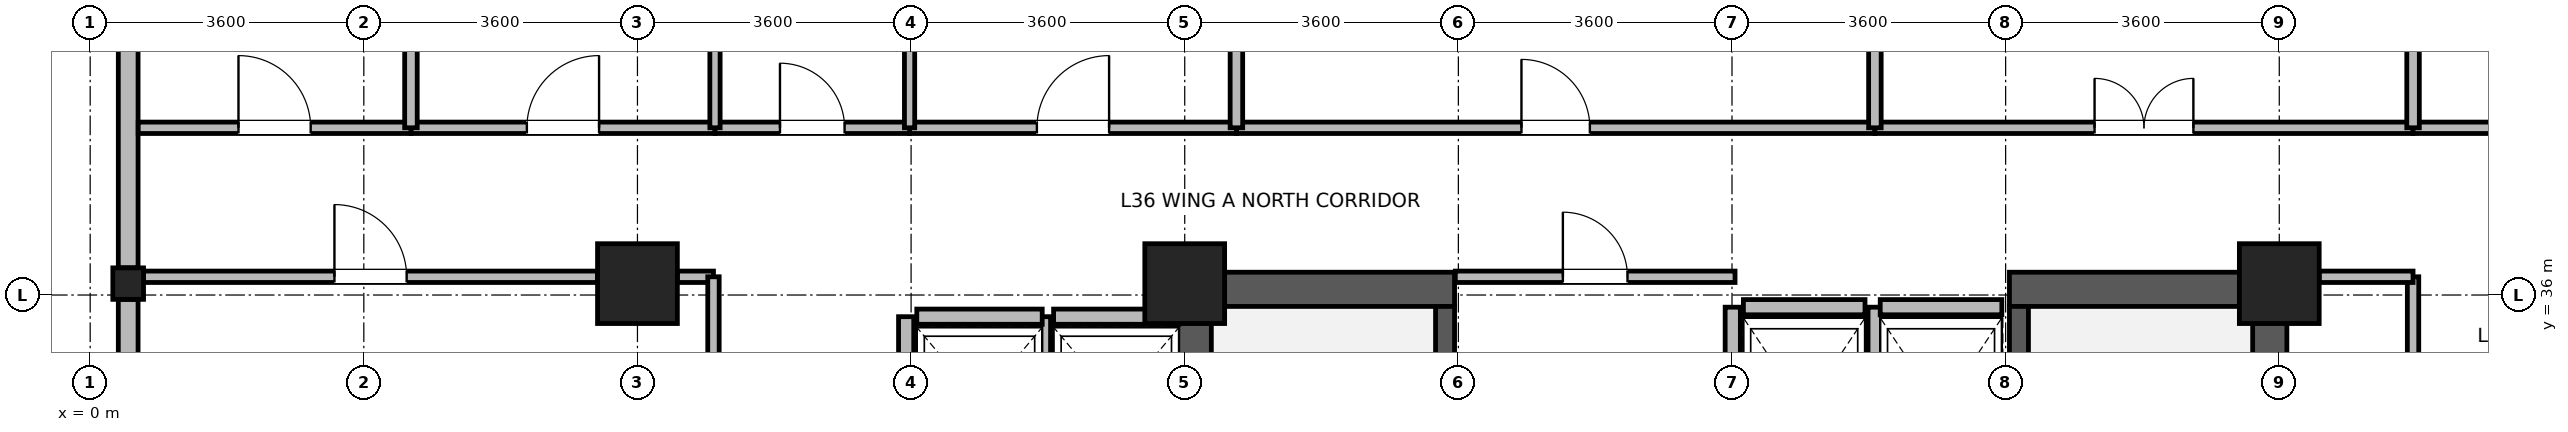
"""IFC4 building model, lengths in metres.
Left out: names, types, materials, properties, quantities, classifications, styles, units other than length and angle.
Written with IfcOpenShell. Run it as: python <this file> out.ifc"""

import sys

from ifc_helpers import new_model, si_unit, direction, frame, frame_2d, origin, origin_2d, place, context, subcontext, project, spatial, rectangle, i_section, extrude, source, transform, mapped, element, fill, save


model = new_model("IFC4")
c1 = context("Model", 3, precision=1e-05, world=origin(), true_north=direction((0.0, 1.0)))
c2 = subcontext(c1, "Body", "Model", "MODEL_VIEW")
j1 = project(units=[si_unit("LENGTHUNIT", "METRE"), si_unit("PLANEANGLEUNIT", "RADIAN")], contexts=[c1])
p1 = place(None, origin())
s1 = spatial("IfcSite", under=j1, at=p1, CompositionType="ELEMENT")
p2 = place(p1, origin())
s2 = spatial("IfcBuilding", under=s1, at=p2, CompositionType="ELEMENT")
p3 = place(p2, frame((0.0, 0.0, 143.9)))
s3 = spatial("IfcBuildingStorey", under=s2, at=p3, CompositionType="ELEMENT", Elevation=143.9)
for number, where, z_axis, x_axis in (
    (1, (14.525, 28.4, 0.0), (0.0, 0.0, 1.0), (0.0, 1.0, 0.0)),
    (2, (28.675, 28.4, 0.0), (0.0, 0.0, 1.0), (0.0, 1.0, 0.0)),
):
    element("IfcWall", number, at=place(p3, frame(where, z_axis=z_axis, x_axis=x_axis)), inside=s3, PredefinedType="SHEAR", context=c2, shape_type="SweptSolid", body=[
        extrude(rectangle(XDim=7.9, YDim=0.45, at=frame_2d((3.95, 0.0))), origin(), (0.0, 0.0, 1.0), 3.46),
    ])
for number, where, z_axis, x_axis in (
    (3, (14.75, 36.075, 0.0), (0.0, 0.0, 1.0), (1.0, 0.0, 0.0)),
    (4, (25.25, 36.075, 0.0), (0.0, 0.0, 1.0), (1.0, 0.0, 0.0)),
):
    element("IfcWall", number, at=place(p3, frame(where, z_axis=z_axis, x_axis=x_axis)), inside=s3, PredefinedType="SHEAR", context=c2, shape_type="SweptSolid", body=[
        extrude(rectangle(XDim=3.2, YDim=0.45, at=frame_2d((1.6, 0.0))), origin(), (0.0, 0.0, 1.0), 3.46),
    ])
p4 = place(p3, frame((17.825, 28.85, 0.0), z_axis=(0.0, 0.0, 1.0), x_axis=(0.0, 1.0, 0.0)))
e5 = element("IfcWall", 5, at=p4, inside=s3, PredefinedType="SHEAR", context=c2, shape_type="SweptSolid", body=[
    extrude(rectangle(XDim=7.0, YDim=0.25, at=frame_2d((3.5, 0.0))), origin(), (0.0, 0.0, 1.0), 3.46),
])
p5 = place(p4, frame((0.15, 0.0, 0.0)))
e6 = element("IfcOpeningElement", 6, at=p5, cuts=e5, PredefinedType="OPENING", context=c2, shape_type="SweptSolid", body=[
    extrude(rectangle(XDim=1.1, YDim=2.08, at=frame_2d((0.55, 1.04))), frame((0.0, 0.135, 0.0), z_axis=(0.0, -1.0, 0.0), x_axis=(1.0, 0.0, 0.0)), (0.0, 0.0, 1.0), 0.27),
])
p6 = place(p3, frame((25.375, 28.85, 0.0), z_axis=(0.0, 0.0, 1.0), x_axis=(0.0, 1.0, 0.0)))
e7 = element("IfcWall", 7, at=p6, inside=s3, PredefinedType="SHEAR", context=c2, shape_type="SweptSolid", body=[
    extrude(rectangle(XDim=7.0, YDim=0.25, at=frame_2d((3.5, 0.0))), origin(), (0.0, 0.0, 1.0), 3.46),
])
p7 = place(p6, frame((0.15, 0.0, 0.0)))
e8 = element("IfcOpeningElement", 8, at=p7, cuts=e7, PredefinedType="OPENING", context=c2, shape_type="SweptSolid", body=[
    extrude(rectangle(XDim=1.1, YDim=2.08, at=frame_2d((0.55, 1.04))), frame((0.0, 0.135, 0.0), z_axis=(0.0, -1.0, 0.0), x_axis=(1.0, 0.0, 0.0)), (0.0, 0.0, 1.0), 0.27),
])
m1 = source(origin(), c2, "Body", "SweptSolid", [
    extrude(rectangle(XDim=1.05, YDim=1.05, at=origin_2d()), origin(), (0.0, 0.0, 1.0), 3.7),
])
for number, where, z_axis, x_axis in (
    (9, (7.2, 36.15, 0.0), (0.0, 0.0, 1.0), (1.0, 0.0, 0.0)),
    (10, (14.4, 36.15, 0.0), (0.0, 0.0, 1.0), (1.0, 0.0, 0.0)),
    (11, (28.8, 36.15, 0.0), (0.0, 0.0, 1.0), (1.0, 0.0, 0.0)),
):
    element("IfcColumn", number, at=place(p3, frame(where, z_axis=z_axis, x_axis=x_axis)), inside=s3, PredefinedType="COLUMN", context=c2, shape_type="MappedRepresentation", body=[
        mapped(m1, transform((0.0, 0.0, 0.0), x_axis=(1.0, 0.0, 0.0), y_axis=(0.0, 1.0, 0.0), z_axis=(0.0, 0.0, 1.0), scale=1.0)),
    ])
m2 = source(origin(), c2, "Body", "SweptSolid", [
    extrude(i_section(OverallWidth=0.404, OverallDepth=0.414, WebThickness=0.021, FlangeThickness=0.028, FilletRadius=0.015, at=origin_2d()), origin(), (0.0, 0.0, 1.0), 3.7),
])
p8 = place(p3, frame((0.5, 36.15, 0.0), z_axis=(0.0, 0.0, 1.0), x_axis=(1.0, 0.0, 0.0)))
e12 = element("IfcColumn", 12, at=p8, inside=s3, PredefinedType="COLUMN", context=c2, shape_type="MappedRepresentation", body=[
    mapped(m2, transform((0.0, 0.0, 0.0), x_axis=(1.0, 0.0, 0.0), y_axis=(0.0, 1.0, 0.0), z_axis=(0.0, 0.0, 1.0), scale=1.0)),
])
p9 = place(p3, frame((0.5, 36.358, 0.0), z_axis=(0.0, 0.0, 1.0), x_axis=(0.0, 1.0, 0.0)))
e13 = element("IfcWall", 13, at=p9, inside=s3, PredefinedType="STANDARD", context=c2, shape_type="SweptSolid", body=[
    extrude(rectangle(XDim=6.972, YDim=0.26, at=frame_2d((3.486, 0.0))), origin(), (0.0, 0.0, 1.0), 3.44),
])
p10 = place(p9, frame((4.329, 0.0, 0.85)))
e14 = element("IfcOpeningElement", 14, at=p10, cuts=e13, PredefinedType="OPENING", context=c2, shape_type="SweptSolid", body=[
    extrude(rectangle(XDim=1.8, YDim=1.85, at=frame_2d((0.9, 0.925))), frame((0.0, 0.14, 0.0), z_axis=(0.0, -1.0, 0.0), x_axis=(1.0, 0.0, 0.0)), (0.0, 0.0, 1.0), 0.28),
])
p11 = place(p9, frame((3.011, 0.0, 0.85)))
e15 = element("IfcOpeningElement", 15, at=p11, cuts=e13, PredefinedType="OPENING", context=c2, shape_type="SweptSolid", body=[
    extrude(rectangle(XDim=0.95, YDim=1.75, at=frame_2d((0.475, 0.875))), frame((0.0, 0.14, 0.0), z_axis=(0.0, -1.0, 0.0), x_axis=(1.0, 0.0, 0.0)), (0.0, 0.0, 1.0), 0.28),
])
p12 = place(p3, frame((0.5, 28.858, 0.0), z_axis=(0.0, 0.0, 1.0), x_axis=(0.0, 1.0, 0.0)))
e16 = element("IfcWall", 16, at=p12, inside=s3, PredefinedType="STANDARD", context=c2, shape_type="SweptSolid", body=[
    extrude(rectangle(XDim=7.084, YDim=0.26, at=frame_2d((3.542, 0.0))), origin(), (0.0, 0.0, 1.0), 2.99),
])
p13 = place(p12, frame((0.871, 0.0, 0.85)))
e17 = element("IfcOpeningElement", 17, at=p13, cuts=e16, PredefinedType="OPENING", context=c2, shape_type="SweptSolid", body=[
    extrude(rectangle(XDim=1.8, YDim=1.85, at=frame_2d((0.9, 0.925))), frame((0.0, 0.14, 0.0), z_axis=(0.0, -1.0, 0.0), x_axis=(1.0, 0.0, 0.0)), (0.0, 0.0, 1.0), 0.28),
])
p14 = place(p12, frame((4.413, 0.0, 0.85)))
e18 = element("IfcOpeningElement", 18, at=p14, cuts=e16, PredefinedType="OPENING", context=c2, shape_type="SweptSolid", body=[
    extrude(rectangle(XDim=1.8, YDim=1.85, at=frame_2d((0.9, 0.925))), frame((0.0, 0.14, 0.0), z_axis=(0.0, -1.0, 0.0), x_axis=(1.0, 0.0, 0.0)), (0.0, 0.0, 1.0), 0.28),
])
p15 = place(p3, frame((12.675, 35.715, 0.0), z_axis=(0.0, 0.0, 1.0), x_axis=(1.0, 0.0, 0.0)))
e19 = element("IfcWall", 19, at=p15, inside=s3, PredefinedType="PARTITIONING", context=c2, shape_type="SweptSolid", body=[
    extrude(rectangle(XDim=1.65, YDim=0.2, at=frame_2d((0.825, 0.0))), origin(), (0.0, 0.0, 1.0), 3.44),
])
p16 = place(p3, frame((12.535, 33.485, 0.0), z_axis=(0.0, 0.0, 1.0), x_axis=(0.0, 1.0, 0.0)))
e20 = element("IfcWall", 20, at=p16, inside=s3, PredefinedType="PARTITIONING", context=c2, shape_type="SweptSolid", body=[
    extrude(rectangle(XDim=2.23, YDim=0.2, at=frame_2d((1.115, 0.0))), origin(), (0.0, 0.0, 1.0), 3.44),
])
p17 = place(p3, frame((10.875, 35.715, 0.0), z_axis=(0.0, 0.0, 1.0), x_axis=(1.0, 0.0, 0.0)))
e21 = element("IfcWall", 21, at=p17, inside=s3, PredefinedType="PARTITIONING", context=c2, shape_type="SweptSolid", body=[
    extrude(rectangle(XDim=1.65, YDim=0.2, at=frame_2d((0.825, 0.0))), origin(), (0.0, 0.0, 1.0), 3.44),
])
p18 = place(p3, frame((10.735, 33.485, 0.0), z_axis=(0.0, 0.0, 1.0), x_axis=(0.0, 1.0, 0.0)))
e22 = element("IfcWall", 22, at=p18, inside=s3, PredefinedType="PARTITIONING", context=c2, shape_type="SweptSolid", body=[
    extrude(rectangle(XDim=2.23, YDim=0.2, at=frame_2d((1.115, 0.0))), origin(), (0.0, 0.0, 1.0), 3.44),
])
p19 = place(p3, frame((21.75, 35.84, 0.0), z_axis=(0.0, 0.0, 1.0), x_axis=(1.0, 0.0, 0.0)))
e23 = element("IfcWall", 23, at=p19, inside=s3, PredefinedType="PARTITIONING", context=c2, shape_type="SweptSolid", body=[
    extrude(rectangle(XDim=1.6, YDim=0.2, at=frame_2d((0.8, 0.0))), origin(), (0.0, 0.0, 1.0), 2.44),
])
for number, where, z_axis, x_axis in (
    (24, (21.61, 33.16, 0.0), (0.0, 0.0, 1.0), (0.0, 1.0, 0.0)),
    (25, (23.49, 33.16, 0.0), (0.0, 0.0, 1.0), (0.0, 1.0, 0.0)),
):
    element("IfcWall", number, at=place(p3, frame(where, z_axis=z_axis, x_axis=x_axis)), inside=s3, PredefinedType="PARTITIONING", context=c2, shape_type="SweptSolid", body=[
        extrude(rectangle(XDim=2.68, YDim=0.2, at=frame_2d((1.34, 0.0))), origin(), (0.0, 0.0, 1.0), 3.44),
    ])
p20 = place(p3, frame((23.55, 35.84, 0.0), z_axis=(0.0, 0.0, 1.0), x_axis=(1.0, 0.0, 0.0)))
e26 = element("IfcWall", 26, at=p20, inside=s3, PredefinedType="PARTITIONING", context=c2, shape_type="SweptSolid", body=[
    extrude(rectangle(XDim=1.6, YDim=0.2, at=frame_2d((0.8, 0.0))), origin(), (0.0, 0.0, 1.0), 2.44),
])
p21 = place(p3, frame((15.08, 38.2, 0.0), z_axis=(0.0, 0.0, 1.0), x_axis=(1.0, 0.0, 0.0)))
e27 = element("IfcWall", 27, at=p21, inside=s3, PredefinedType="PARTITIONING", context=c2, shape_type="SweptSolid", body=[
    extrude(rectangle(XDim=8.4, YDim=0.15, at=frame_2d((4.2, 0.0))), origin(), (0.0, 0.0, 1.0), 3.44),
])
p22 = place(p21, frame((3.75, 0.0, 0.0)))
e28 = element("IfcOpeningElement", 28, at=p22, cuts=e27, PredefinedType="OPENING", context=c2, shape_type="SweptSolid", body=[
    extrude(rectangle(XDim=0.9, YDim=2.08, at=frame_2d((0.45, 1.04))), frame((0.0, 0.085, 0.0), z_axis=(0.0, -1.0, 0.0), x_axis=(1.0, 0.0, 0.0)), (0.0, 0.0, 1.0), 0.17),
])
p23 = place(p3, frame((0.702, 36.24, 0.0), z_axis=(0.0, 0.0, 1.0), x_axis=(1.0, 0.0, 0.0)))
e29 = element("IfcWall", 29, at=p23, inside=s3, PredefinedType="PARTITIONING", context=c2, shape_type="SweptSolid", body=[
    extrude(rectangle(XDim=5.973, YDim=0.15, at=frame_2d((2.987, 0.0))), origin(), (0.0, 0.0, 1.0), 2.84),
])
p24 = place(p23, frame((2.511, 0.0, 0.0)))
e30 = element("IfcOpeningElement", 30, at=p24, cuts=e29, PredefinedType="OPENING", context=c2, shape_type="SweptSolid", body=[
    extrude(rectangle(XDim=0.95, YDim=2.1, at=frame_2d((0.475, 1.05))), frame((0.0, 0.085, 0.0), z_axis=(0.0, -1.0, 0.0), x_axis=(1.0, 0.0, 0.0)), (0.0, 0.0, 1.0), 0.17),
])
p25 = place(p3, frame((7.725, 36.24, 0.0), z_axis=(0.0, 0.0, 1.0), x_axis=(1.0, 0.0, 0.0)))
e31 = element("IfcWall", 31, at=p25, inside=s3, PredefinedType="PARTITIONING", context=c2, shape_type="SweptSolid", body=[
    extrude(rectangle(XDim=0.475, YDim=0.15, at=frame_2d((0.237, 0.0))), origin(), (0.0, 0.0, 1.0), 2.84),
])
p26 = place(p3, frame((23.48, 38.2, 0.0), z_axis=(0.0, 0.0, 1.0), x_axis=(1.0, 0.0, 0.0)))
e32 = element("IfcWall", 32, at=p26, inside=s3, PredefinedType="PARTITIONING", context=c2, shape_type="SweptSolid", body=[
    extrude(rectangle(XDim=7.08, YDim=0.15, at=frame_2d((3.54, 0.0))), origin(), (0.0, 0.0, 1.0), 3.44),
])
p27 = place(p26, frame((2.89, 0.0, 0.0)))
e33 = element("IfcOpeningElement", 33, at=p27, cuts=e32, PredefinedType="OPENING", context=c2, shape_type="SweptSolid", body=[
    extrude(rectangle(XDim=1.3, YDim=2.12, at=frame_2d((0.65, 1.06))), frame((0.0, 0.085, 0.0), z_axis=(0.0, -1.0, 0.0), x_axis=(1.0, 0.0, 0.0)), (0.0, 0.0, 1.0), 0.17),
])
p28 = place(p3, frame((30.56, 38.2, 0.0), z_axis=(0.0, 0.0, 1.0), x_axis=(1.0, 0.0, 0.0)))
e34 = element("IfcWall", 34, at=p28, inside=s3, PredefinedType="PARTITIONING", context=c2, shape_type="SweptSolid", body=[
    extrude(rectangle(XDim=4.8, YDim=0.15, at=frame_2d((2.4, 0.0))), origin(), (0.0, 0.0, 1.0), 3.44),
])
p29 = place(p28, frame((1.75, 0.0, 0.0)))
e35 = element("IfcOpeningElement", 35, at=p29, cuts=e34, PredefinedType="OPENING", context=c2, shape_type="SweptSolid", body=[
    extrude(rectangle(XDim=1.3, YDim=2.12, at=frame_2d((0.65, 1.06))), frame((0.0, 0.085, 0.0), z_axis=(0.0, -1.0, 0.0), x_axis=(1.0, 0.0, 0.0)), (0.0, 0.0, 1.0), 0.17),
])
p30 = place(p3, frame((10.78, 38.2, 0.0), z_axis=(0.0, 0.0, 1.0), x_axis=(1.0, 0.0, 0.0)))
e36 = element("IfcWall", 36, at=p30, inside=s3, PredefinedType="PARTITIONING", context=c2, shape_type="SweptSolid", body=[
    extrude(rectangle(XDim=4.3, YDim=0.15, at=frame_2d((2.15, 0.0))), origin(), (0.0, 0.0, 1.0), 3.44),
])
p31 = place(p30, frame((1.675, 0.0, 0.0)))
e37 = element("IfcOpeningElement", 37, at=p31, cuts=e36, PredefinedType="OPENING", context=c2, shape_type="SweptSolid", body=[
    extrude(rectangle(XDim=0.95, YDim=2.1, at=frame_2d((0.475, 1.05))), frame((0.0, 0.085, 0.0), z_axis=(0.0, -1.0, 0.0), x_axis=(1.0, 0.0, 0.0)), (0.0, 0.0, 1.0), 0.17),
])
p32 = place(p3, frame((4.22, 38.2, 0.0), z_axis=(0.0, 0.0, 1.0), x_axis=(1.0, 0.0, 0.0)))
e38 = element("IfcWall", 38, at=p32, inside=s3, PredefinedType="PARTITIONING", context=c2, shape_type="SweptSolid", body=[
    extrude(rectangle(XDim=4.0, YDim=0.15, at=frame_2d((2.0, 0.0))), origin(), (0.0, 0.0, 1.0), 3.44),
])
p33 = place(p32, frame((1.525, 0.0, 0.0)))
e39 = element("IfcOpeningElement", 39, at=p33, cuts=e38, PredefinedType="OPENING", context=c2, shape_type="SweptSolid", body=[
    extrude(rectangle(XDim=0.95, YDim=2.1, at=frame_2d((0.475, 1.05))), frame((0.0, 0.085, 0.0), z_axis=(0.0, -1.0, 0.0), x_axis=(1.0, 0.0, 0.0)), (0.0, 0.0, 1.0), 0.17),
])
p34 = place(p3, frame((8.2, 32.4, 0.0), z_axis=(0.0, 0.0, 1.0), x_axis=(0.0, 1.0, 0.0)))
e40 = element("IfcWall", 40, at=p34, inside=s3, PredefinedType="PARTITIONING", context=c2, shape_type="SweptSolid", body=[
    extrude(rectangle(XDim=3.84, YDim=0.15, at=frame_2d((1.92, 0.0))), origin(), (0.0, 0.0, 1.0), 3.44),
])
p35 = place(p3, frame((30.56, 32.4, 0.0), z_axis=(0.0, 0.0, 1.0), x_axis=(0.0, 1.0, 0.0)))
e41 = element("IfcWall", 41, at=p35, inside=s3, PredefinedType="PARTITIONING", context=c2, shape_type="SweptSolid", body=[
    extrude(rectangle(XDim=3.84, YDim=0.15, at=frame_2d((1.92, 0.0))), origin(), (0.0, 0.0, 1.0), 3.44),
])
p36 = place(p35, frame((1.27, 0.0, 0.0)))
e42 = element("IfcOpeningElement", 42, at=p36, cuts=e41, PredefinedType="OPENING", context=c2, shape_type="SweptSolid", body=[
    extrude(rectangle(XDim=1.3, YDim=2.12, at=frame_2d((0.65, 1.06))), frame((0.0, 0.085, 0.0), z_axis=(0.0, -1.0, 0.0), x_axis=(1.0, 0.0, 0.0)), (0.0, 0.0, 1.0), 0.17),
])
p37 = place(p3, frame((0.632, 38.2, 0.0), z_axis=(0.0, 0.0, 1.0), x_axis=(1.0, 0.0, 0.0)))
e43 = element("IfcWall", 43, at=p37, inside=s3, PredefinedType="PARTITIONING", context=c2, shape_type="SweptSolid", body=[
    extrude(rectangle(XDim=3.588, YDim=0.15, at=frame_2d((1.794, 0.0))), origin(), (0.0, 0.0, 1.0), 3.44),
])
p38 = place(p37, frame((1.319, 0.0, 0.0)))
e44 = element("IfcOpeningElement", 44, at=p38, cuts=e43, PredefinedType="OPENING", context=c2, shape_type="SweptSolid", body=[
    extrude(rectangle(XDim=0.95, YDim=2.1, at=frame_2d((0.475, 1.05))), frame((0.0, 0.085, 0.0), z_axis=(0.0, -1.0, 0.0), x_axis=(1.0, 0.0, 0.0)), (0.0, 0.0, 1.0), 0.17),
])
p39 = place(p3, frame((17.96, 36.24, 0.0), z_axis=(0.0, 0.0, 1.0), x_axis=(1.0, 0.0, 0.0)))
e45 = element("IfcWall", 45, at=p39, inside=s3, PredefinedType="PARTITIONING", context=c2, shape_type="SweptSolid", body=[
    extrude(rectangle(XDim=3.68, YDim=0.15, at=frame_2d((1.84, 0.0))), origin(), (0.0, 0.0, 1.0), 2.44),
])
p40 = place(p39, frame((1.415, 0.0, 0.0)))
e46 = element("IfcOpeningElement", 46, at=p40, cuts=e45, PredefinedType="OPENING", context=c2, shape_type="SweptSolid", body=[
    extrude(rectangle(XDim=0.85, YDim=2.04, at=frame_2d((0.425, 1.02))), frame((0.0, 0.085, 0.0), z_axis=(0.0, -1.0, 0.0), x_axis=(1.0, 0.0, 0.0)), (0.0, 0.0, 1.0), 0.17),
])
p41 = place(p3, frame((8.22, 38.2, 0.0), z_axis=(0.0, 0.0, 1.0), x_axis=(1.0, 0.0, 0.0)))
e47 = element("IfcWall", 47, at=p41, inside=s3, PredefinedType="PARTITIONING", context=c2, shape_type="SweptSolid", body=[
    extrude(rectangle(XDim=2.56, YDim=0.15, at=frame_2d((1.28, 0.0))), origin(), (0.0, 0.0, 1.0), 3.44),
])
p42 = place(p41, frame((0.855, 0.0, 0.0)))
e48 = element("IfcOpeningElement", 48, at=p42, cuts=e47, PredefinedType="OPENING", context=c2, shape_type="SweptSolid", body=[
    extrude(rectangle(XDim=0.85, YDim=2.04, at=frame_2d((0.425, 1.02))), frame((0.0, 0.085, 0.0), z_axis=(0.0, -1.0, 0.0), x_axis=(1.0, 0.0, 0.0)), (0.0, 0.0, 1.0), 0.17),
])
p43 = place(p3, frame((29.325, 36.24, 0.0), z_axis=(0.0, 0.0, 1.0), x_axis=(1.0, 0.0, 0.0)))
e49 = element("IfcWall", 49, at=p43, inside=s3, PredefinedType="PARTITIONING", context=c2, shape_type="SweptSolid", body=[
    extrude(rectangle(XDim=1.235, YDim=0.15, at=frame_2d((0.618, 0.0))), origin(), (0.0, 0.0, 1.0), 2.84),
])
p44 = place(p3, frame((4.22, 38.2, 0.0), z_axis=(0.0, 0.0, 1.0), x_axis=(0.0, 1.0, 0.0)))
e50 = element("IfcWall", 50, at=p44, inside=s3, PredefinedType="PARTITIONING", context=c2, shape_type="SweptSolid", body=[
    extrude(rectangle(XDim=4.868, YDim=0.165, at=frame_2d((2.434, 0.0))), origin(), (0.0, 0.0, 1.0), 3.44),
])
for number, where, z_axis, x_axis in (
    (51, (8.22, 38.2, 0.0), (0.0, 0.0, 1.0), (0.0, 1.0, 0.0)),
    (52, (10.78, 38.2, 0.0), (0.0, 0.0, 1.0), (0.0, 1.0, 0.0)),
):
    element("IfcWall", number, at=place(p3, frame(where, z_axis=z_axis, x_axis=x_axis)), inside=s3, PredefinedType="PARTITIONING", context=c2, shape_type="SweptSolid", body=[
        extrude(rectangle(XDim=4.868, YDim=0.135, at=frame_2d((2.434, 0.0))), origin(), (0.0, 0.0, 1.0), 3.44),
    ])
for number, where, z_axis, x_axis in (
    (53, (15.08, 38.2, 0.0), (0.0, 0.0, 1.0), (0.0, 1.0, 0.0)),
    (54, (23.48, 38.2, 0.0), (0.0, 0.0, 1.0), (0.0, 1.0, 0.0)),
    (55, (30.56, 38.2, 0.0), (0.0, 0.0, 1.0), (0.0, 1.0, 0.0)),
):
    element("IfcWall", number, at=place(p3, frame(where, z_axis=z_axis, x_axis=x_axis)), inside=s3, PredefinedType="PARTITIONING", context=c2, shape_type="SweptSolid", body=[
        extrude(rectangle(XDim=4.868, YDim=0.165, at=frame_2d((2.434, 0.0))), origin(), (0.0, 0.0, 1.0), 3.44),
    ])
p45 = place(p22, origin())
e56 = element("IfcDoor", 56, at=p45, inside=s3, OperationType="SINGLE_SWING_LEFT", PredefinedType="DOOR", context=c2, shape_type="SweptSolid", body=[
    extrude(rectangle(XDim=0.9, YDim=2.08, at=frame_2d((0.45, 1.04))), frame((0.0, 0.025, 0.0), z_axis=(0.0, -1.0, 0.0), x_axis=(1.0, 0.0, 0.0)), (0.0, 0.0, 1.0), 0.05),
])
fill(e28, e56)
p46 = place(p24, origin())
e57 = element("IfcDoor", 57, at=p46, inside=s3, OperationType="SINGLE_SWING_LEFT", PredefinedType="DOOR", context=c2, shape_type="SweptSolid", body=[
    extrude(rectangle(XDim=0.95, YDim=2.1, at=frame_2d((0.475, 1.05))), frame((0.0, 0.025, 0.0), z_axis=(0.0, -1.0, 0.0), x_axis=(1.0, 0.0, 0.0)), (0.0, 0.0, 1.0), 0.05),
])
fill(e30, e57)
p47 = place(p27, origin())
e58 = element("IfcDoor", 58, at=p47, inside=s3, OperationType="DOUBLE_DOOR_SINGLE_SWING", PredefinedType="DOOR", context=c2, shape_type="SweptSolid", body=[
    extrude(rectangle(XDim=1.3, YDim=2.12, at=frame_2d((0.65, 1.06))), frame((0.0, 0.025, 0.0), z_axis=(0.0, -1.0, 0.0), x_axis=(1.0, 0.0, 0.0)), (0.0, 0.0, 1.0), 0.05),
])
fill(e33, e58)
p48 = place(p31, origin())
e59 = element("IfcDoor", 59, at=p48, inside=s3, OperationType="SINGLE_SWING_RIGHT", PredefinedType="DOOR", context=c2, shape_type="SweptSolid", body=[
    extrude(rectangle(XDim=0.95, YDim=2.1, at=frame_2d((0.475, 1.05))), frame((0.0, 0.025, 0.0), z_axis=(0.0, -1.0, 0.0), x_axis=(1.0, 0.0, 0.0)), (0.0, 0.0, 1.0), 0.05),
])
fill(e37, e59)
p49 = place(p33, origin())
e60 = element("IfcDoor", 60, at=p49, inside=s3, OperationType="SINGLE_SWING_RIGHT", PredefinedType="DOOR", context=c2, shape_type="SweptSolid", body=[
    extrude(rectangle(XDim=0.95, YDim=2.1, at=frame_2d((0.475, 1.05))), frame((0.0, 0.025, 0.0), z_axis=(0.0, -1.0, 0.0), x_axis=(1.0, 0.0, 0.0)), (0.0, 0.0, 1.0), 0.05),
])
fill(e39, e60)
p50 = place(p38, origin())
e61 = element("IfcDoor", 61, at=p50, inside=s3, OperationType="SINGLE_SWING_LEFT", PredefinedType="DOOR", context=c2, shape_type="SweptSolid", body=[
    extrude(rectangle(XDim=0.95, YDim=2.1, at=frame_2d((0.475, 1.05))), frame((0.0, 0.025, 0.0), z_axis=(0.0, -1.0, 0.0), x_axis=(1.0, 0.0, 0.0)), (0.0, 0.0, 1.0), 0.05),
])
fill(e44, e61)
p51 = place(p40, origin())
e62 = element("IfcDoor", 62, at=p51, inside=s3, OperationType="SINGLE_SWING_LEFT", PredefinedType="DOOR", context=c2, shape_type="SweptSolid", body=[
    extrude(rectangle(XDim=0.85, YDim=2.04, at=frame_2d((0.425, 1.02))), frame((0.0, 0.025, 0.0), z_axis=(0.0, -1.0, 0.0), x_axis=(1.0, 0.0, 0.0)), (0.0, 0.0, 1.0), 0.05),
])
fill(e46, e62)
p52 = place(p42, origin())
e63 = element("IfcDoor", 63, at=p52, inside=s3, OperationType="SINGLE_SWING_LEFT", PredefinedType="DOOR", context=c2, shape_type="SweptSolid", body=[
    extrude(rectangle(XDim=0.85, YDim=2.04, at=frame_2d((0.425, 1.02))), frame((0.0, 0.025, 0.0), z_axis=(0.0, -1.0, 0.0), x_axis=(1.0, 0.0, 0.0)), (0.0, 0.0, 1.0), 0.05),
])
fill(e48, e63)
save(model, sys.argv[1])
